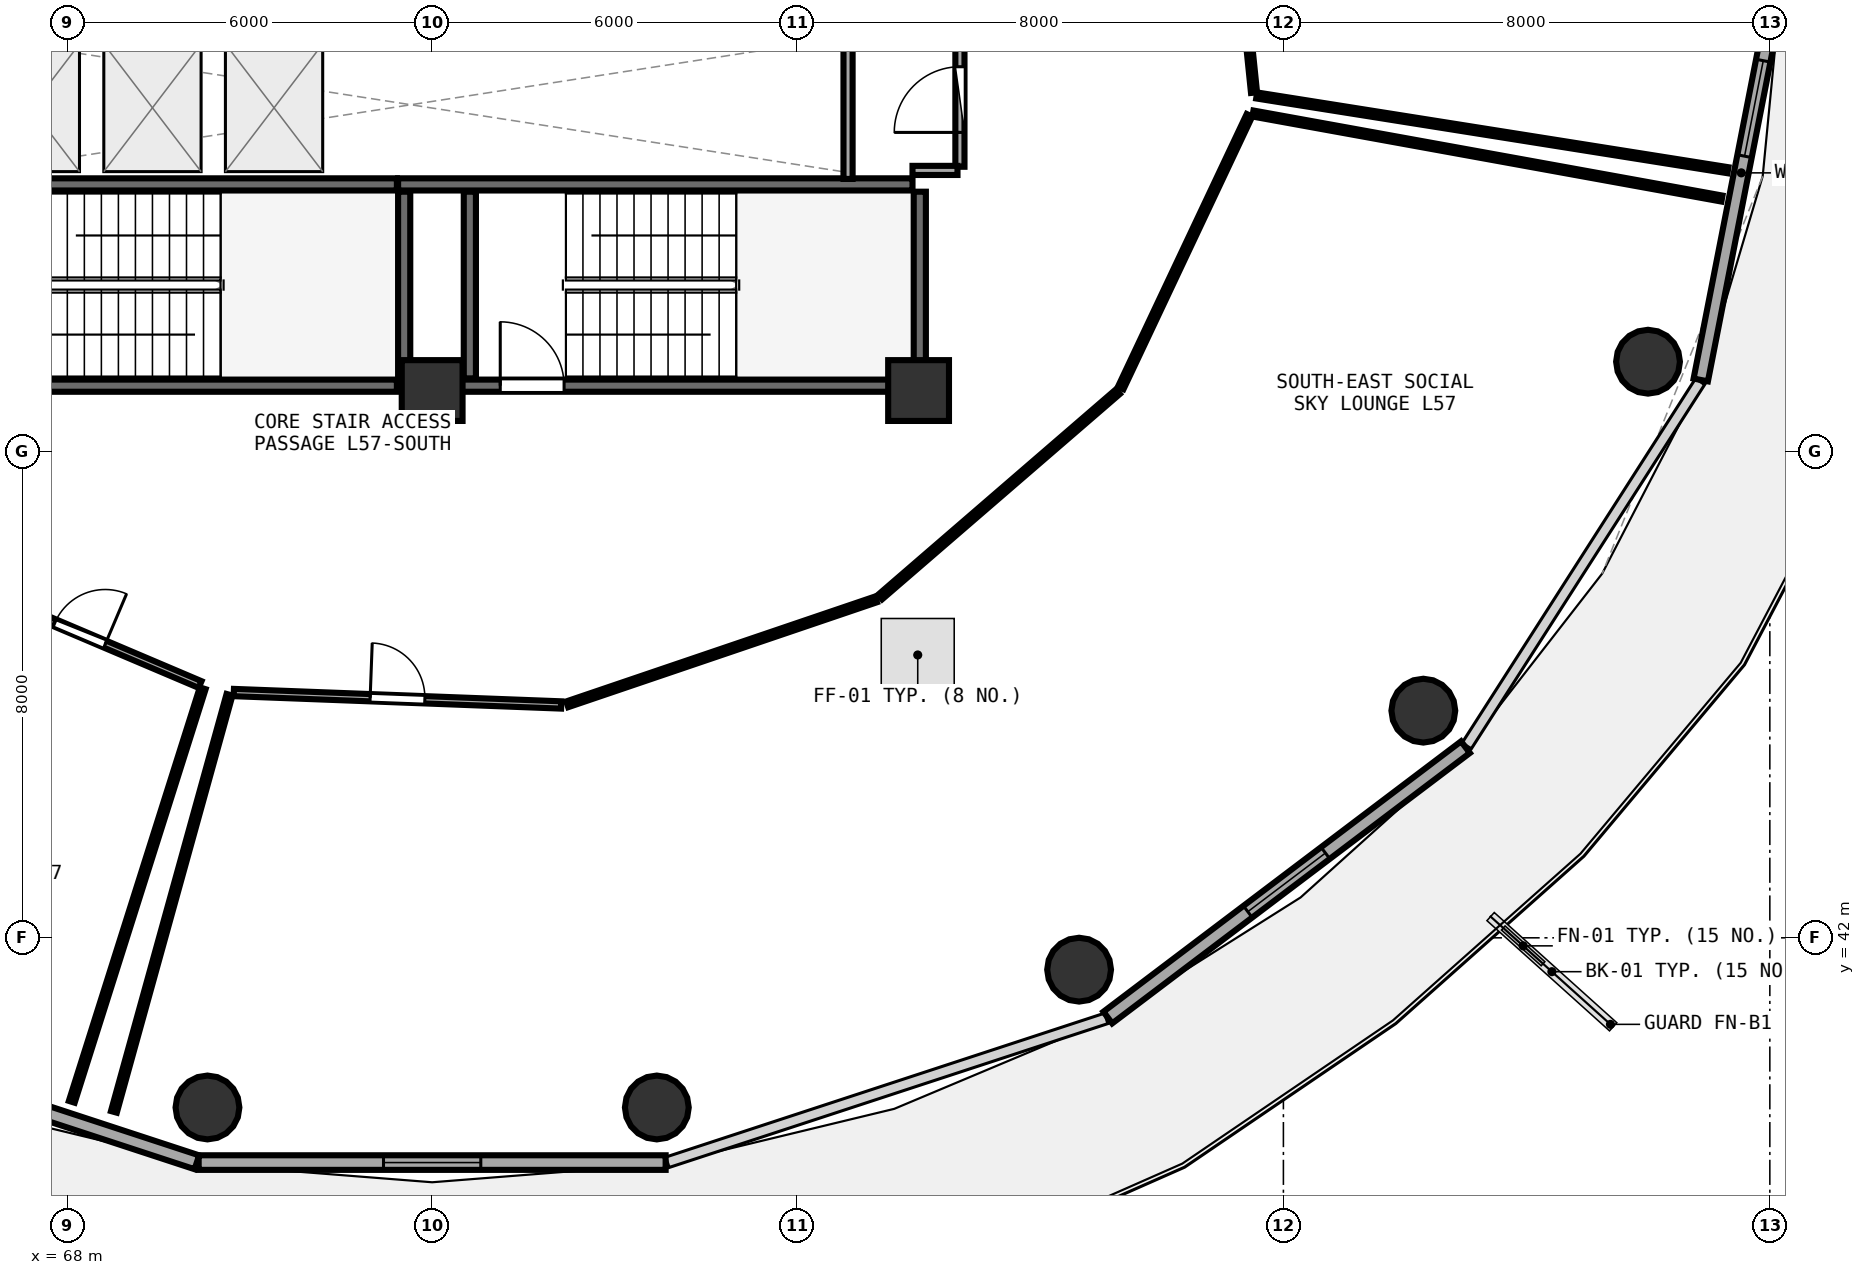
"""IFC4 building model, lengths in metres.
Left out: names, types, materials, properties, quantities, classifications, styles, units other than length and angle.
Written with IfcOpenShell. Run it as: python <this file> out.ifc"""

import sys

from ifc_helpers import new_model, si_unit, direction, frame, frame_2d, origin, origin_2d, place, context, subcontext, project, spatial, rectangle, circle, extrude, element, fill, save


model = new_model("IFC4")
c1 = context("Model", 3, precision=1e-05, world=origin(), true_north=direction((0.0, 1.0)))
c2 = subcontext(c1, "Body", "Model", "MODEL_VIEW")
j1 = project(units=[si_unit("LENGTHUNIT", "METRE"), si_unit("PLANEANGLEUNIT", "RADIAN")], contexts=[c1])
p1 = place(None, origin())
s1 = spatial("IfcSite", under=j1, at=p1, CompositionType="ELEMENT")
p2 = place(p1, origin())
s2 = spatial("IfcBuilding", under=s1, at=p2, CompositionType="ELEMENT")
p3 = place(p2, frame((0.0, 0.0, 223.2)))
s3 = spatial("IfcBuildingStorey", under=s2, at=p3, CompositionType="ELEMENT", Elevation=223.2)
for number, where, z_axis, x_axis in (
    (1, (74.0, 51.0, 0.0), (0.0, 0.0, 1.0), (1.0, 0.0, 0.0)),
    (2, (82.0, 51.0, 0.0), (0.0, 0.0, 1.0), (1.0, 0.0, 0.0)),
):
    element("IfcColumn", number, at=place(p3, frame(where, z_axis=z_axis, x_axis=x_axis)), inside=s3, PredefinedType="PILASTER", context=c2, shape_type="SweptSolid", body=[
        extrude(rectangle(XDim=1.0, YDim=1.0, at=origin_2d()), origin(), (0.0, 0.0, 1.0), 3.75),
    ])
for number, where, z_axis, x_axis in (
    (3, (70.305, 39.21, 0.0), (0.0, 0.0, 1.0), (1.0, 0.0, 0.0)),
    (4, (77.695, 39.21, 0.0), (0.0, 0.0, 1.0), (1.0, 0.0, 0.0)),
    (5, (84.64, 41.476, 0.0), (0.0, 0.0, 1.0), (1.0, 0.0, 0.0)),
    (6, (90.302, 45.736, 0.0), (0.0, 0.0, 1.0), (1.0, 0.0, 0.0)),
    (7, (93.997, 51.474, 0.0), (0.0, 0.0, 1.0), (1.0, 0.0, 0.0)),
):
    element("IfcColumn", number, at=place(p3, frame(where, z_axis=z_axis, x_axis=x_axis)), inside=s3, PredefinedType="COLUMN", context=c2, shape_type="SweptSolid", body=[
        extrude(circle(Radius=0.525, at=origin_2d()), origin(), (0.0, 0.0, 1.0), 3.75),
    ])
p4 = place(p3, frame((62.914, 40.675, 0.0), z_axis=(0.0, 0.0, 1.0), x_axis=(0.95022142767, -0.31157541366, 0.0)))
e8 = element("IfcWall", 8, at=p4, inside=s3, PredefinedType="SOLIDWALL", context=c2, shape_type="SweptSolid", body=[
    extrude(rectangle(XDim=7.594, YDim=0.24, at=frame_2d((3.797, 0.0))), origin(), (0.0, 0.0, 1.0), 3.475),
])
p5 = place(p4, frame((2.997, 0.0, 0.85)))
e9 = element("IfcOpeningElement", 9, at=p5, cuts=e8, PredefinedType="OPENING", context=c2, shape_type="SweptSolid", body=[
    extrude(rectangle(XDim=1.6, YDim=1.45, at=frame_2d((0.8, 0.725))), frame((0.0, 0.13, 0.0), z_axis=(0.0, -1.0, 0.0), x_axis=(1.0, 0.0, 0.0)), (0.0, 0.0, 1.0), 0.26),
])
p6 = place(p3, frame((70.16, 38.304, 0.0), z_axis=(0.0, 0.0, 1.0), x_axis=(1.0, 0.0, 0.0)))
e10 = element("IfcWall", 10, at=p6, inside=s3, PredefinedType="SOLIDWALL", context=c2, shape_type="SweptSolid", body=[
    extrude(rectangle(XDim=7.68, YDim=0.24, at=frame_2d((3.84, 0.0))), origin(), (0.0, 0.0, 1.0), 3.475),
])
p7 = place(p6, frame((3.04, 0.0, 0.85)))
e11 = element("IfcOpeningElement", 11, at=p7, cuts=e10, PredefinedType="OPENING", context=c2, shape_type="SweptSolid", body=[
    extrude(rectangle(XDim=1.6, YDim=1.45, at=frame_2d((0.8, 0.725))), frame((0.0, 0.13, 0.0), z_axis=(0.0, -1.0, 0.0), x_axis=(1.0, 0.0, 0.0)), (0.0, 0.0, 1.0), 0.26),
])
p8 = place(p3, frame((85.112, 40.688, 0.0), z_axis=(0.0, 0.0, 1.0), x_axis=(0.797701674595, 0.603052268338, 0.0)))
e12 = element("IfcWall", 12, at=p8, inside=s3, PredefinedType="SOLIDWALL", context=c2, shape_type="SweptSolid", body=[
    extrude(rectangle(XDim=7.374, YDim=0.24, at=frame_2d((3.687, 0.0))), origin(), (0.0, 0.0, 1.0), 3.475),
])
p9 = place(p8, frame((2.887, 0.0, 0.85)))
e13 = element("IfcOpeningElement", 13, at=p9, cuts=e12, PredefinedType="OPENING", context=c2, shape_type="SweptSolid", body=[
    extrude(rectangle(XDim=1.6, YDim=1.45, at=frame_2d((0.8, 0.725))), frame((0.0, 0.13, 0.0), z_axis=(0.0, -1.0, 0.0), x_axis=(1.0, 0.0, 0.0)), (0.0, 0.0, 1.0), 0.26),
])
p10 = place(p3, frame((94.864, 51.174, 0.0), z_axis=(0.0, 0.0, 1.0), x_axis=(0.192069055673, 0.981381413036, 0.0)))
e14 = element("IfcWall", 14, at=p10, inside=s3, PredefinedType="SOLIDWALL", context=c2, shape_type="SweptSolid", body=[
    extrude(rectangle(XDim=6.94, YDim=0.24, at=frame_2d((3.47, 0.0))), origin(), (0.0, 0.0, 1.0), 3.475),
])
p11 = place(p10, frame((3.75, 0.0, 0.85)))
e15 = element("IfcOpeningElement", 15, at=p11, cuts=e14, PredefinedType="OPENING", context=c2, shape_type="SweptSolid", body=[
    extrude(rectangle(XDim=1.6, YDim=1.45, at=frame_2d((0.8, 0.725))), frame((0.0, 0.13, 0.0), z_axis=(0.0, -1.0, 0.0), x_axis=(1.0, 0.0, 0.0)), (0.0, 0.0, 1.0), 0.26),
])
p12 = place(p3, frame((74.0, 51.08, 0.0), z_axis=(0.0, 0.0, 1.0), x_axis=(1.0, 0.0, 0.0)))
e16 = element("IfcWall", 16, at=p12, inside=s3, PredefinedType="SHEAR", context=c2, shape_type="SweptSolid", body=[
    extrude(rectangle(XDim=7.9, YDim=0.2, at=frame_2d((3.95, 0.0))), origin(), (0.0, 0.0, 1.0), 3.49),
])
p13 = place(p12, frame((1.12, 0.0, 0.0)))
e17 = element("IfcOpeningElement", 17, at=p13, cuts=e16, PredefinedType="OPENING", context=c2, shape_type="SweptSolid", body=[
    extrude(rectangle(XDim=1.05, YDim=2.1, at=frame_2d((0.525, 1.05))), frame((0.0, 0.11, 0.0), z_axis=(0.0, -1.0, 0.0), x_axis=(1.0, 0.0, 0.0)), (0.0, 0.0, 1.0), 0.22),
])
p14 = place(p3, frame((82.02, 51.2, 0.0), z_axis=(0.0, 0.0, 1.0), x_axis=(0.0, 1.0, 0.0)))
e18 = element("IfcWall", 18, at=p14, inside=s3, PredefinedType="SHEAR", context=c2, shape_type="SweptSolid", body=[
    extrude(rectangle(XDim=3.07, YDim=0.2, at=frame_2d((1.535, 0.0))), origin(), (0.0, 0.0, 1.0), 3.49),
])
p15 = place(p3, frame((81.9, 54.39, 0.0), z_axis=(0.0, 0.0, 1.0), x_axis=(-1.0, 0.0, 0.0)))
e19 = element("IfcWall", 19, at=p15, inside=s3, PredefinedType="SHEAR", context=c2, shape_type="SweptSolid", body=[
    extrude(rectangle(XDim=8.46, YDim=0.2, at=frame_2d((4.23, 0.0))), origin(), (0.0, 0.0, 1.0), 3.49),
])
p16 = place(p3, frame((74.62, 54.27, 0.0), z_axis=(0.0, 0.0, 1.0), x_axis=(0.0, -1.0, 0.0)))
e20 = element("IfcWall", 20, at=p16, inside=s3, PredefinedType="SHEAR", context=c2, shape_type="SweptSolid", body=[
    extrude(rectangle(XDim=3.07, YDim=0.2, at=frame_2d((1.535, 0.0))), origin(), (0.0, 0.0, 1.0), 3.49),
])
p17 = place(p3, frame((66.26, 51.08, 0.0), z_axis=(0.0, 0.0, 1.0), x_axis=(1.0, 0.0, 0.0)))
e21 = element("IfcWall", 21, at=p17, inside=s3, PredefinedType="SHEAR", context=c2, shape_type="SweptSolid", body=[
    extrude(rectangle(XDim=7.16, YDim=0.2, at=frame_2d((3.58, 0.0))), origin(), (0.0, 0.0, 1.0), 3.49),
])
p18 = place(p3, frame((73.54, 51.2, 0.0), z_axis=(0.0, 0.0, 1.0), x_axis=(0.0, 1.0, 0.0)))
e22 = element("IfcWall", 22, at=p18, inside=s3, PredefinedType="SHEAR", context=c2, shape_type="SweptSolid", body=[
    extrude(rectangle(XDim=3.07, YDim=0.2, at=frame_2d((1.535, 0.0))), origin(), (0.0, 0.0, 1.0), 3.49),
])
p19 = place(p3, frame((73.42, 54.39, 0.0), z_axis=(0.0, 0.0, 1.0), x_axis=(-1.0, 0.0, 0.0)))
e23 = element("IfcWall", 23, at=p19, inside=s3, PredefinedType="SHEAR", context=c2, shape_type="SweptSolid", body=[
    extrude(rectangle(XDim=7.16, YDim=0.2, at=frame_2d((3.58, 0.0))), origin(), (0.0, 0.0, 1.0), 3.49),
])
p20 = place(p3, frame((80.84, 54.48, 0.0), z_axis=(0.0, 0.0, 1.0), x_axis=(0.0, 1.0, 0.0)))
e24 = element("IfcWall", 24, at=p20, inside=s3, PredefinedType="PARTITIONING", context=c2, shape_type="SweptSolid", body=[
    extrude(rectangle(XDim=2.29, YDim=0.15, at=frame_2d((1.145, 0.0))), origin(), (0.0, 0.0, 1.0), 3.48),
])
p21 = place(p3, frame((82.68, 54.68, 0.0), z_axis=(0.0, 0.0, 1.0), x_axis=(0.0, 1.0, 0.0)))
e25 = element("IfcWall", 25, at=p21, inside=s3, PredefinedType="PARTITIONING", context=c2, shape_type="SweptSolid", body=[
    extrude(rectangle(XDim=2.21, YDim=0.15, at=frame_2d((1.105, 0.0))), origin(), (0.0, 0.0, 1.0), 3.48),
])
p22 = place(p21, frame((0.565, 0.0, 0.0)))
e26 = element("IfcOpeningElement", 26, at=p22, cuts=e25, PredefinedType="OPENING", context=c2, shape_type="SweptSolid", body=[
    extrude(rectangle(XDim=1.08, YDim=2.1, at=frame_2d((0.54, 1.05))), frame((0.0, 0.085, 0.0), z_axis=(0.0, -1.0, 0.0), x_axis=(1.0, 0.0, 0.0)), (0.0, 0.0, 1.0), 0.17),
])
p23 = place(p3, frame((70.738, 46.034, 0.0), z_axis=(0.0, 0.0, 1.0), x_axis=(0.99928078405, -0.037919844777, 0.0)))
e27 = element("IfcWall", 27, at=p23, inside=s3, PredefinedType="PARTITIONING", context=c2, shape_type="SweptSolid", body=[
    extrude(rectangle(XDim=5.389, YDim=0.12, at=frame_2d((2.694, 0.0))), origin(), (0.0, 0.0, 1.0), 3.025),
])
p24 = place(p23, frame((2.244, 0.0, 0.0)))
e28 = element("IfcOpeningElement", 28, at=p24, cuts=e27, PredefinedType="OPENING", context=c2, shape_type="SweptSolid", body=[
    extrude(rectangle(XDim=0.9, YDim=2.08, at=frame_2d((0.45, 1.04))), frame((0.0, 0.07, 0.0), z_axis=(0.0, -1.0, 0.0), x_axis=(1.0, 0.0, 0.0)), (0.0, 0.0, 1.0), 0.14),
])
p25 = place(p3, frame((66.233, 47.843, 0.0), z_axis=(0.0, 0.0, 1.0), x_axis=(0.920481353999, -0.390786485105, 0.0)))
e29 = element("IfcWall", 29, at=p25, inside=s3, PredefinedType="PARTITIONING", context=c2, shape_type="SweptSolid", body=[
    extrude(rectangle(XDim=4.292, YDim=0.12, at=frame_2d((2.146, 0.0))), origin(), (0.0, 0.0, 1.0), 3.235),
])
p26 = place(p25, frame((1.696, 0.0, 0.0)))
e30 = element("IfcOpeningElement", 30, at=p26, cuts=e29, PredefinedType="OPENING", context=c2, shape_type="SweptSolid", body=[
    extrude(rectangle(XDim=0.9, YDim=2.08, at=frame_2d((0.45, 1.04))), frame((0.0, 0.07, 0.0), z_axis=(0.0, -1.0, 0.0), x_axis=(1.0, 0.0, 0.0)), (0.0, 0.0, 1.0), 0.14),
])
p27 = place(p3, frame((81.9, 54.62, 0.0), z_axis=(0.0, 0.0, 1.0), x_axis=(1.0, 0.0, 0.0)))
e31 = element("IfcWall", 31, at=p27, inside=s3, PredefinedType="PARTITIONING", context=c2, shape_type="SweptSolid", body=[
    extrude(rectangle(XDim=0.74, YDim=0.15, at=frame_2d((0.37, 0.0))), origin(), (0.0, 0.0, 1.0), 2.775),
])
p28 = place(p3, frame((76.221, 45.84, 0.0), z_axis=(0.0, 0.0, 1.0), x_axis=(0.946842090113, 0.321698704367, 0.0)))
e32 = element("IfcWall", 32, at=p28, inside=s3, PredefinedType="PARTITIONING", context=c2, shape_type="SweptSolid", body=[
    extrude(rectangle(XDim=5.363, YDim=0.1, at=frame_2d((2.682, 0.0))), origin(), (0.0, 0.0, 1.0), 3.235),
])
p29 = place(p3, frame((81.367, 47.604, 0.0), z_axis=(0.0, 0.0, 1.0), x_axis=(0.756843194568, 0.653596495428, 0.0)))
e33 = element("IfcWall", 33, at=p29, inside=s3, PredefinedType="PARTITIONING", context=c2, shape_type="SweptSolid", body=[
    extrude(rectangle(XDim=5.167, YDim=0.1, at=frame_2d((2.583, 0.0))), origin(), (0.0, 0.0, 1.0), 3.025),
])
p30 = place(p3, frame((85.325, 51.043, 0.0), z_axis=(0.0, 0.0, 1.0), x_axis=(0.426911240237, 0.904293532521, 0.0)))
e34 = element("IfcWall", 34, at=p30, inside=s3, PredefinedType="PARTITIONING", context=c2, shape_type="SweptSolid", body=[
    extrude(rectangle(XDim=4.958, YDim=0.1, at=frame_2d((2.479, 0.0))), origin(), (0.0, 0.0, 1.0), 3.025),
])
p31 = place(p3, frame((87.498, 55.556, 0.0), z_axis=(0.0, 0.0, 1.0), x_axis=(0.983952512008, -0.178430530217, 0.0)))
e35 = element("IfcWall", 35, at=p31, inside=s3, PredefinedType="PARTITIONING", context=c2, shape_type="SweptSolid", body=[
    extrude(rectangle(XDim=7.84, YDim=0.1, at=frame_2d((3.92, 0.0))), origin(), (0.0, 0.0, 1.0), 3.075),
])
p32 = place(p3, frame((68.766, 39.137, 0.0), z_axis=(0.0, 0.0, 1.0), x_axis=(0.267125564166, 0.96366173161, 0.0)))
e36 = element("IfcWall", 36, at=p32, inside=s3, PredefinedType="PARTITIONING", context=c2, shape_type="SweptSolid", body=[
    extrude(rectangle(XDim=7.119, YDim=0.1, at=frame_2d((3.56, 0.0))), origin(), (0.0, 0.0, 1.0), 3.075),
])
p33 = place(p3, frame((87.517, 55.899, 0.0), z_axis=(0.0, 0.0, 1.0), x_axis=(-0.101648252044, 0.994820402312, 0.0)))
e37 = element("IfcWall", 37, at=p33, inside=s3, PredefinedType="PARTITIONING", context=c2, shape_type="SweptSolid", body=[
    extrude(rectangle(XDim=6.413, YDim=0.1, at=frame_2d((3.207, 0.0))), origin(), (0.0, 0.0, 1.0), 3.025),
])
p34 = place(p3, frame((95.312, 54.623, 0.0), z_axis=(0.0, 0.0, 1.0), x_axis=(-0.987651731417, 0.156665431505, 0.0)))
e38 = element("IfcWall", 38, at=p34, inside=s3, PredefinedType="PARTITIONING", context=c2, shape_type="SweptSolid", body=[
    extrude(rectangle(XDim=7.848, YDim=0.1, at=frame_2d((3.924, 0.0))), origin(), (0.0, 0.0, 1.0), 3.075),
])
p35 = place(p3, frame((70.227, 46.104, 0.0), z_axis=(0.0, 0.0, 1.0), x_axis=(-0.30191088513, -0.953336151334, 0.0)))
e39 = element("IfcWall", 39, at=p35, inside=s3, PredefinedType="PARTITIONING", context=c2, shape_type="SweptSolid", body=[
    extrude(rectangle(XDim=7.134, YDim=0.1, at=frame_2d((3.567, 0.0))), origin(), (0.0, 0.0, 1.0), 3.075),
])
p36 = place(p7, origin())
e40 = element("IfcWindow", 40, at=p36, inside=s3, PartitioningType="SINGLE_PANEL", PredefinedType="WINDOW", context=c2, shape_type="SweptSolid", body=[
    extrude(rectangle(XDim=1.6, YDim=1.45, at=frame_2d((0.8, 0.725))), frame((0.0, 0.03, 0.0), z_axis=(0.0, -1.0, 0.0), x_axis=(1.0, 0.0, 0.0)), (0.0, 0.0, 1.0), 0.06),
])
fill(e11, e40)
p37 = place(p9, origin())
e41 = element("IfcWindow", 41, at=p37, inside=s3, PartitioningType="SINGLE_PANEL", PredefinedType="WINDOW", context=c2, shape_type="SweptSolid", body=[
    extrude(rectangle(XDim=1.6, YDim=1.45, at=frame_2d((0.8, 0.725))), frame((0.0, 0.03, 0.0), z_axis=(0.0, -1.0, 0.0), x_axis=(1.0, 0.0, 0.0)), (0.0, 0.0, 1.0), 0.06),
])
fill(e13, e41)
p38 = place(p11, origin())
e42 = element("IfcWindow", 42, at=p38, inside=s3, PartitioningType="SINGLE_PANEL", PredefinedType="WINDOW", context=c2, shape_type="SweptSolid", body=[
    extrude(rectangle(XDim=1.6, YDim=1.45, at=frame_2d((0.8, 0.725))), frame((0.0, 0.03, 0.0), z_axis=(0.0, -1.0, 0.0), x_axis=(1.0, 0.0, 0.0)), (0.0, 0.0, 1.0), 0.06),
])
fill(e15, e42)
p39 = place(p13, origin())
e43 = element("IfcDoor", 43, at=p39, inside=s3, OperationType="SINGLE_SWING_LEFT", PredefinedType="DOOR", context=c2, shape_type="SweptSolid", body=[
    extrude(rectangle(XDim=1.05, YDim=2.1, at=frame_2d((0.525, 1.05))), frame((0.0, 0.025, 0.0), z_axis=(0.0, -1.0, 0.0), x_axis=(1.0, 0.0, 0.0)), (0.0, 0.0, 1.0), 0.05),
])
fill(e17, e43)
p40 = place(p22, origin())
e44 = element("IfcDoor", 44, at=p40, inside=s3, OperationType="SINGLE_SWING_LEFT", PredefinedType="DOOR", context=c2, shape_type="SweptSolid", body=[
    extrude(rectangle(XDim=1.08, YDim=2.1, at=frame_2d((0.54, 1.05))), frame((0.0, 0.025, 0.0), z_axis=(0.0, -1.0, 0.0), x_axis=(1.0, 0.0, 0.0)), (0.0, 0.0, 1.0), 0.05),
])
fill(e26, e44)
p41 = place(p24, origin())
e45 = element("IfcDoor", 45, at=p41, inside=s3, OperationType="SINGLE_SWING_LEFT", PredefinedType="DOOR", context=c2, shape_type="SweptSolid", body=[
    extrude(rectangle(XDim=0.9, YDim=2.08, at=frame_2d((0.45, 1.04))), frame((0.0, 0.025, 0.0), z_axis=(0.0, -1.0, 0.0), x_axis=(1.0, 0.0, 0.0)), (0.0, 0.0, 1.0), 0.05),
])
fill(e28, e45)
p42 = place(p26, origin())
e46 = element("IfcDoor", 46, at=p42, inside=s3, OperationType="SINGLE_SWING_RIGHT", PredefinedType="DOOR", context=c2, shape_type="SweptSolid", body=[
    extrude(rectangle(XDim=0.9, YDim=2.08, at=frame_2d((0.45, 1.04))), frame((0.0, 0.025, 0.0), z_axis=(0.0, -1.0, 0.0), x_axis=(1.0, 0.0, 0.0)), (0.0, 0.0, 1.0), 0.05),
])
fill(e30, e46)
save(model, sys.argv[1])
